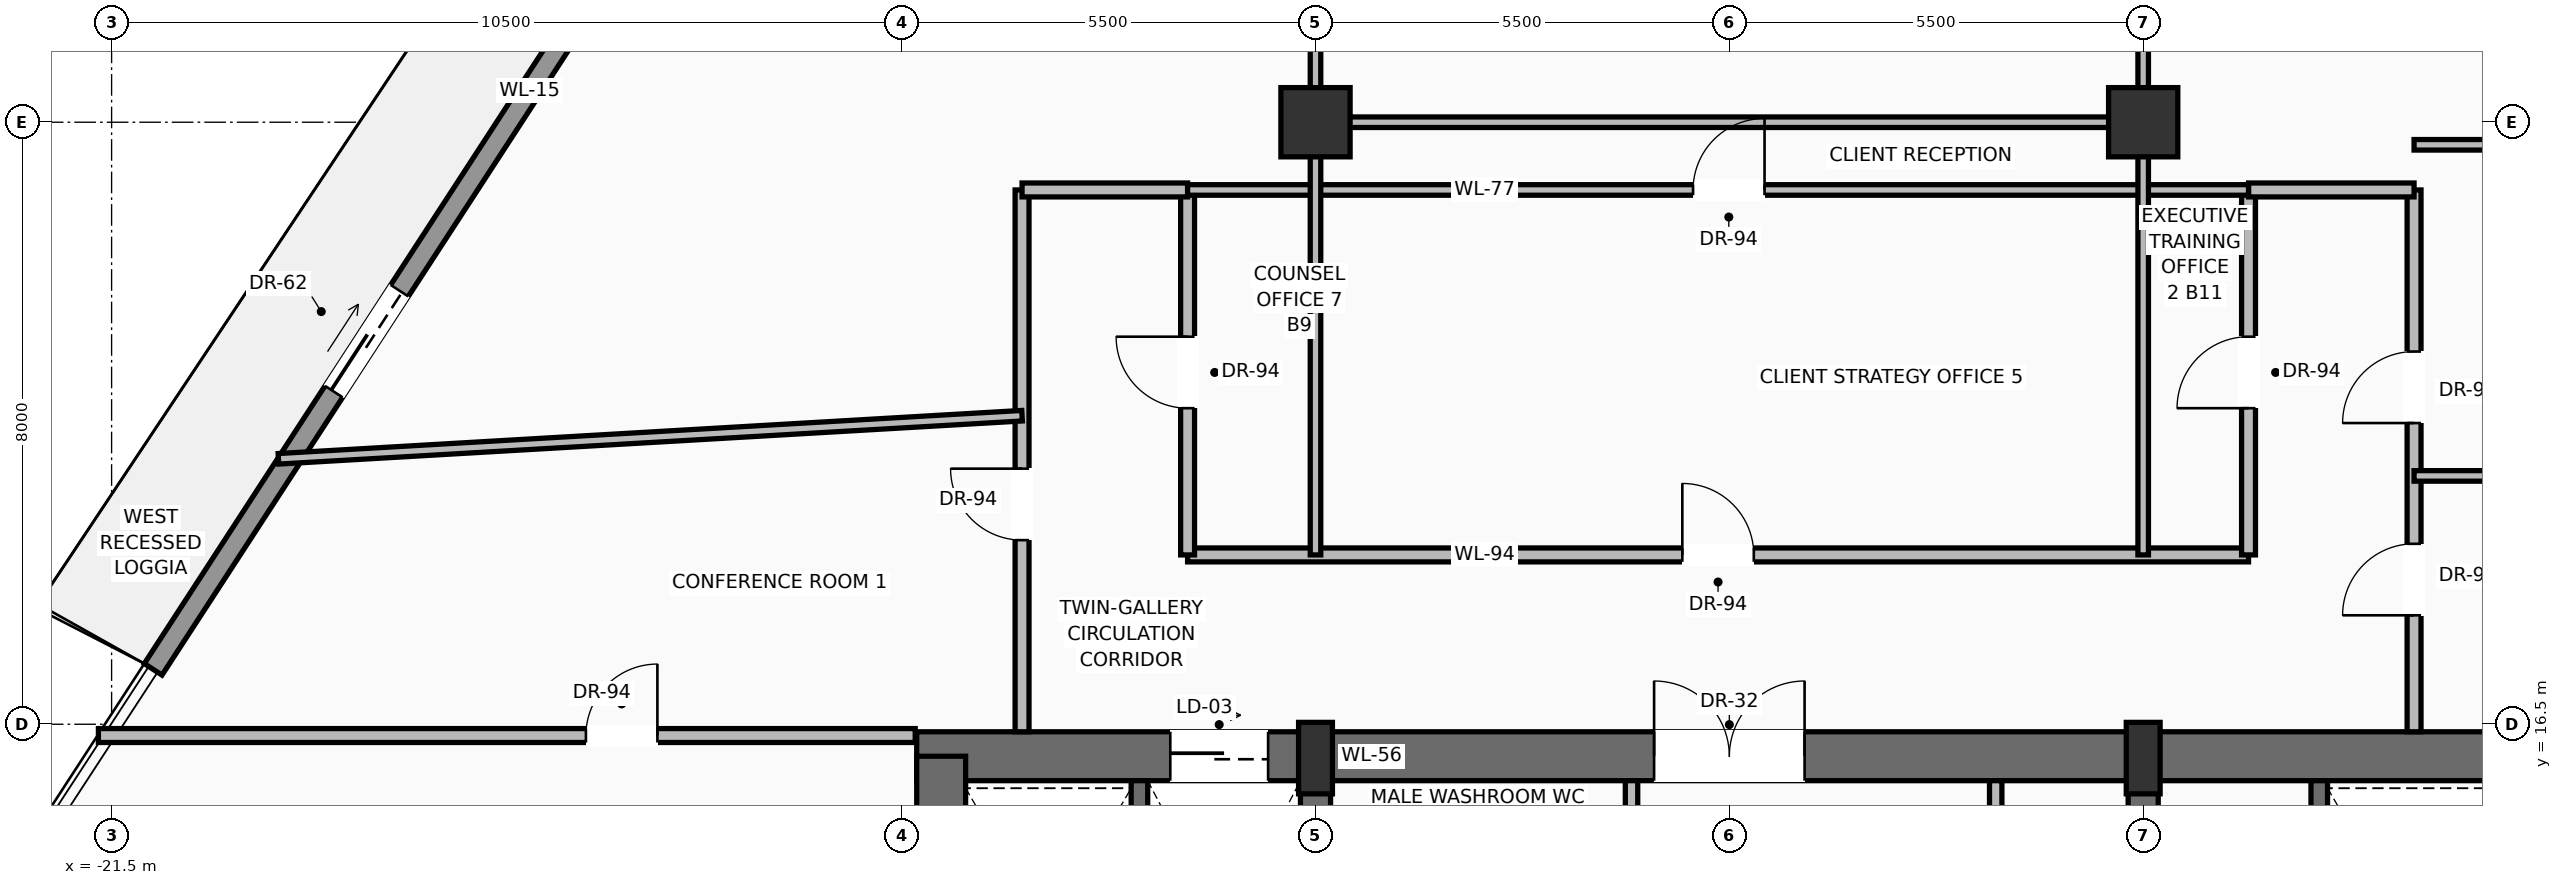
"""IFC4 building model, lengths in metres.
Left out: names, types, materials, properties, quantities, classifications, styles, units other than length and angle.
Written with IfcOpenShell. Run it as: python <this file> out.ifc"""

import sys

from ifc_helpers import new_model, si_unit, direction, frame, frame_2d, origin, origin_2d, place, context, subcontext, project, spatial, rectangle, extrude, source, transform, mapped, element, fill, save


model = new_model("IFC4")
c1 = context("Model", 3, precision=1e-05, world=origin(), true_north=direction((0.0, 1.0)))
c2 = subcontext(c1, "Body", "Model", "MODEL_VIEW")
j1 = project(units=[si_unit("LENGTHUNIT", "METRE"), si_unit("PLANEANGLEUNIT", "RADIAN")], contexts=[c1])
p1 = place(None, origin())
s1 = spatial("IfcSite", under=j1, at=p1, CompositionType="ELEMENT")
p2 = place(p1, origin())
s2 = spatial("IfcBuilding", under=s1, at=p2, CompositionType="ELEMENT")
p3 = place(p2, frame((0.0, 0.0, 140.4)))
s3 = spatial("IfcBuildingStorey", under=s2, at=p3, CompositionType="ELEMENT", Elevation=140.4)
p4 = place(p3, frame((-10.8, 16.075, 0.0), z_axis=(0.0, 0.0, 1.0), x_axis=(1.0, 0.0, 0.0)))
e1 = element("IfcWall", 1, at=p4, inside=s3, PredefinedType="SHEAR", context=c2, shape_type="SweptSolid", body=[
    extrude(rectangle(XDim=21.6, YDim=0.65, at=frame_2d((10.8, 0.0))), origin(), (0.0, 0.0, 1.0), 3.47),
])
p5 = place(p4, frame((3.37, 0.0, 0.0)))
e2 = element("IfcOpeningElement", 2, at=p5, cuts=e1, PredefinedType="OPENING", context=c2, shape_type="SweptSolid", body=[
    extrude(rectangle(XDim=1.3, YDim=2.3, at=frame_2d((0.65, 1.15))), frame((0.0, 0.335, 0.0), z_axis=(0.0, -1.0, 0.0), x_axis=(1.0, 0.0, 0.0)), (0.0, 0.0, 1.0), 0.67),
])
p6 = place(p4, frame((9.8, 0.0, 0.0)))
e3 = element("IfcOpeningElement", 3, at=p6, cuts=e1, PredefinedType="OPENING", context=c2, shape_type="SweptSolid", body=[
    extrude(rectangle(XDim=2.0, YDim=2.4, at=frame_2d((1.0, 1.2))), frame((0.0, 0.335, 0.0), z_axis=(0.0, -1.0, 0.0), x_axis=(1.0, 0.0, 0.0)), (0.0, 0.0, 1.0), 0.67),
])
p7 = place(p3, frame((-10.475, 0.525, 0.0), z_axis=(0.0, 0.0, 1.0), x_axis=(0.0, 1.0, 0.0)))
e4 = element("IfcWall", 4, at=p7, inside=s3, PredefinedType="SHEAR", context=c2, shape_type="SweptSolid", body=[
    extrude(rectangle(XDim=15.55, YDim=0.65, at=frame_2d((7.775, 0.0))), origin(), (0.0, 0.0, 1.0), 3.47),
])
p8 = place(p3, frame((-5.5, 0.525, 0.0), z_axis=(0.0, 0.0, 1.0), x_axis=(0.0, 1.0, 0.0)))
e5 = element("IfcWall", 5, at=p8, inside=s3, PredefinedType="SHEAR", context=c2, shape_type="SweptSolid", body=[
    extrude(rectangle(XDim=15.55, YDim=0.4, at=frame_2d((7.775, 0.0))), origin(), (0.0, 0.0, 1.0), 3.47),
])
p9 = place(p8, frame((8.975, 0.0, 0.0)))
e6 = element("IfcOpeningElement", 6, at=p9, cuts=e5, PredefinedType="OPENING", context=c2, shape_type="SweptSolid", body=[
    extrude(rectangle(XDim=1.1, YDim=2.2, at=frame_2d((0.55, 1.1))), frame((0.0, 0.21, 0.0), z_axis=(0.0, -1.0, 0.0), x_axis=(1.0, 0.0, 0.0)), (0.0, 0.0, 1.0), 0.42),
])
p10 = place(p3, frame((5.5, 0.525, 0.0), z_axis=(0.0, 0.0, 1.0), x_axis=(0.0, 1.0, 0.0)))
e7 = element("IfcWall", 7, at=p10, inside=s3, PredefinedType="SHEAR", context=c2, shape_type="SweptSolid", body=[
    extrude(rectangle(XDim=15.55, YDim=0.4, at=frame_2d((7.775, 0.0))), origin(), (0.0, 0.0, 1.0), 3.47),
])
p11 = place(p10, frame((8.975, 0.0, 0.0)))
e8 = element("IfcOpeningElement", 8, at=p11, cuts=e7, PredefinedType="OPENING", context=c2, shape_type="SweptSolid", body=[
    extrude(rectangle(XDim=1.1, YDim=2.2, at=frame_2d((0.55, 1.1))), frame((0.0, 0.21, 0.0), z_axis=(0.0, -1.0, 0.0), x_axis=(1.0, 0.0, 0.0)), (0.0, 0.0, 1.0), 0.42),
])
m1 = source(origin(), c2, "Body", "SweptSolid", [
    extrude(rectangle(XDim=0.45, YDim=0.95, at=origin_2d()), origin(), (0.0, 0.0, 1.0), 3.7),
])
for number, where, z_axis, x_axis in (
    (9, (-5.5, 16.05, 0.0), (0.0, 0.0, 1.0), (1.0, 0.0, 0.0)),
    (10, (5.5, 16.05, 0.0), (0.0, 0.0, 1.0), (1.0, 0.0, 0.0)),
):
    element("IfcColumn", number, at=place(p3, frame(where, z_axis=z_axis, x_axis=x_axis)), inside=s3, PredefinedType="PILASTER", context=c2, shape_type="MappedRepresentation", body=[
        mapped(m1, transform((0.0, 0.0, 0.0), scale=1.0)),
    ])
m2 = source(origin(), c2, "Body", "SweptSolid", [
    extrude(rectangle(XDim=0.92, YDim=0.92, at=origin_2d()), origin(), (0.0, 0.0, 1.0), 3.7),
])
for number, where, z_axis, x_axis in (
    (11, (-5.5, 24.5, 0.0), (0.0, 0.0, 1.0), (1.0, 0.0, 0.0)),
    (12, (5.5, 24.5, 0.0), (0.0, 0.0, 1.0), (1.0, 0.0, 0.0)),
):
    element("IfcColumn", number, at=place(p3, frame(where, z_axis=z_axis, x_axis=x_axis)), inside=s3, PredefinedType="COLUMN", context=c2, shape_type="MappedRepresentation", body=[
        mapped(m2, transform((0.0, 0.0, 0.0), scale=1.0)),
    ])
p12 = place(p3, frame((-20.948, 17.229, 0.0), z_axis=(0.0, 0.0, 1.0), x_axis=(0.545376053717, 0.838191481723, 0.0)))
e13 = element("IfcWall", 13, at=p12, inside=s3, PredefinedType="SOLIDWALL", context=c2, shape_type="SweptSolid", body=[
    extrude(rectangle(XDim=18.346, YDim=0.28, at=frame_2d((9.173, 0.0))), origin(), (0.0, 0.0, 1.0), 3.05),
])
p13 = place(p12, frame((4.403, 0.0, 0.0)))
e14 = element("IfcOpeningElement", 14, at=p13, cuts=e13, PredefinedType="OPENING", context=c2, shape_type="SweptSolid", body=[
    extrude(rectangle(XDim=1.6, YDim=2.35, at=frame_2d((0.8, 1.175))), frame((0.0, 0.15, 0.0), z_axis=(0.0, -1.0, 0.0), x_axis=(1.0, 0.0, 0.0)), (0.0, 0.0, 1.0), 0.3),
])
p14 = place(p12, frame((12.475, 0.0, 0.9)))
e15 = element("IfcOpeningElement", 15, at=p14, cuts=e13, PredefinedType="OPENING", context=c2, shape_type="SweptSolid", body=[
    extrude(rectangle(XDim=1.55, YDim=1.85, at=frame_2d((0.775, 0.925))), frame((0.0, 0.15, 0.0), z_axis=(0.0, -1.0, 0.0), x_axis=(1.0, 0.0, 0.0)), (0.0, 0.0, 1.0), 0.3),
])
for number, where, z_axis, x_axis in (
    (16, (-7.84, 11.87, 0.0), (0.0, 0.0, 1.0), (0.0, 1.0, 0.0)),
    (17, (7.84, 11.87, 0.0), (0.0, 0.0, 1.0), (0.0, 1.0, 0.0)),
):
    element("IfcWall", number, at=place(p3, frame(where, z_axis=z_axis, x_axis=x_axis)), inside=s3, PredefinedType="SOLIDWALL", context=c2, shape_type="SweptSolid", body=[
        extrude(rectangle(XDim=3.88, YDim=0.22, at=frame_2d((1.94, 0.0))), origin(), (0.0, 0.0, 1.0), 3.47),
    ])
p15 = place(p3, frame((-1.3, 13.6, 0.0), z_axis=(0.0, 0.0, 1.0), x_axis=(0.0, 1.0, 0.0)))
e18 = element("IfcWall", 18, at=p15, inside=s3, PredefinedType="PARTITIONING", context=c2, shape_type="SweptSolid", body=[
    extrude(rectangle(XDim=2.15, YDim=0.165, at=frame_2d((1.075, 0.0))), origin(), (0.0, 0.0, 1.0), 3.462),
])
p16 = place(p15, frame((0.55, 0.0, 0.0)))
e19 = element("IfcOpeningElement", 19, at=p16, cuts=e18, PredefinedType="OPENING", context=c2, shape_type="SweptSolid", body=[
    extrude(rectangle(XDim=0.9, YDim=2.1, at=frame_2d((0.45, 1.05))), frame((0.0, 0.093, 0.0), z_axis=(0.0, -1.0, 0.0), x_axis=(1.0, 0.0, 0.0)), (0.0, 0.0, 1.0), 0.185),
])
p17 = place(p3, frame((3.54, 11.22, 0.0), z_axis=(0.0, 0.0, 1.0), x_axis=(0.0, 1.0, 0.0)))
e20 = element("IfcWall", 20, at=p17, inside=s3, PredefinedType="PARTITIONING", context=c2, shape_type="SweptSolid", body=[
    extrude(rectangle(XDim=4.53, YDim=0.165, at=frame_2d((2.265, 0.0))), origin(), (0.0, 0.0, 1.0), 3.462),
])
p18 = place(p17, frame((1.25, 0.0, 0.0)))
e21 = element("IfcOpeningElement", 21, at=p18, cuts=e20, PredefinedType="OPENING", context=c2, shape_type="SweptSolid", body=[
    extrude(rectangle(XDim=0.9, YDim=2.1, at=frame_2d((0.45, 1.05))), frame((0.0, 0.093, 0.0), z_axis=(0.0, -1.0, 0.0), x_axis=(1.0, 0.0, 0.0)), (0.0, 0.0, 1.0), 0.185),
])
p19 = place(p3, frame((-7.2, 18.75, 0.0), z_axis=(0.0, 0.0, 1.0), x_axis=(1.0, 0.0, 0.0)))
e22 = element("IfcWall", 22, at=p19, inside=s3, PredefinedType="PARTITIONING", context=c2, shape_type="SweptSolid", body=[
    extrude(rectangle(XDim=14.1, YDim=0.185, at=frame_2d((7.05, 0.0))), origin(), (0.0, 0.0, 1.0), 2.846),
])
p20 = place(p19, frame((6.575, 0.0, 0.0)))
e23 = element("IfcOpeningElement", 23, at=p20, cuts=e22, PredefinedType="OPENING", context=c2, shape_type="SweptSolid", body=[
    extrude(rectangle(XDim=0.95, YDim=2.2, at=frame_2d((0.475, 1.1))), frame((0.0, 0.103, 0.0), z_axis=(0.0, -1.0, 0.0), x_axis=(1.0, 0.0, 0.0)), (0.0, 0.0, 1.0), 0.205),
])
p21 = place(p3, frame((-7.2, 18.75, 0.0), z_axis=(0.0, 0.0, 1.0), x_axis=(0.0, 1.0, 0.0)))
e24 = element("IfcWall", 24, at=p21, inside=s3, PredefinedType="PARTITIONING", context=c2, shape_type="SweptSolid", body=[
    extrude(rectangle(XDim=4.85, YDim=0.185, at=frame_2d((2.425, 0.0))), origin(), (0.0, 0.0, 1.0), 3.462),
])
p22 = place(p21, frame((1.95, 0.0, 0.0)))
e25 = element("IfcOpeningElement", 25, at=p22, cuts=e24, PredefinedType="OPENING", context=c2, shape_type="SweptSolid", body=[
    extrude(rectangle(XDim=0.95, YDim=2.2, at=frame_2d((0.475, 1.1))), frame((0.0, 0.103, 0.0), z_axis=(0.0, -1.0, 0.0), x_axis=(1.0, 0.0, 0.0)), (0.0, 0.0, 1.0), 0.205),
])
p23 = place(p3, frame((6.9, 18.75, 0.0), z_axis=(0.0, 0.0, 1.0), x_axis=(0.0, 1.0, 0.0)))
e26 = element("IfcWall", 26, at=p23, inside=s3, PredefinedType="PARTITIONING", context=c2, shape_type="SweptSolid", body=[
    extrude(rectangle(XDim=4.85, YDim=0.185, at=frame_2d((2.425, 0.0))), origin(), (0.0, 0.0, 1.0), 3.462),
])
p24 = place(p23, frame((1.95, 0.0, 0.0)))
e27 = element("IfcOpeningElement", 27, at=p24, cuts=e26, PredefinedType="OPENING", context=c2, shape_type="SweptSolid", body=[
    extrude(rectangle(XDim=0.95, YDim=2.2, at=frame_2d((0.475, 1.1))), frame((0.0, 0.103, 0.0), z_axis=(0.0, -1.0, 0.0), x_axis=(1.0, 0.0, 0.0)), (0.0, 0.0, 1.0), 0.205),
])
p25 = place(p3, frame((-9.4, 16.4, 0.0), z_axis=(0.0, 0.0, 1.0), x_axis=(0.0, 1.0, 0.0)))
e28 = element("IfcWall", 28, at=p25, inside=s3, PredefinedType="PARTITIONING", context=c2, shape_type="SweptSolid", body=[
    extrude(rectangle(XDim=7.2, YDim=0.185, at=frame_2d((3.6, 0.0))), origin(), (0.0, 0.0, 1.0), 3.462),
])
p26 = place(p25, frame((2.546, 0.0, 0.0)))
e29 = element("IfcOpeningElement", 29, at=p26, cuts=e28, PredefinedType="OPENING", context=c2, shape_type="SweptSolid", body=[
    extrude(rectangle(XDim=0.95, YDim=2.2, at=frame_2d((0.475, 1.1))), frame((0.0, 0.103, 0.0), z_axis=(0.0, -1.0, 0.0), x_axis=(1.0, 0.0, 0.0)), (0.0, 0.0, 1.0), 0.205),
])
p27 = place(p3, frame((9.1, 16.4, 0.0), z_axis=(0.0, 0.0, 1.0), x_axis=(0.0, 1.0, 0.0)))
e30 = element("IfcWall", 30, at=p27, inside=s3, PredefinedType="PARTITIONING", context=c2, shape_type="SweptSolid", body=[
    extrude(rectangle(XDim=7.2, YDim=0.185, at=frame_2d((3.6, 0.0))), origin(), (0.0, 0.0, 1.0), 3.462),
])
p28 = place(p27, frame((4.103, 0.0, 0.0)))
e31 = element("IfcOpeningElement", 31, at=p28, cuts=e30, PredefinedType="OPENING", context=c2, shape_type="SweptSolid", body=[
    extrude(rectangle(XDim=0.95, YDim=2.2, at=frame_2d((0.475, 1.1))), frame((0.0, 0.103, 0.0), z_axis=(0.0, -1.0, 0.0), x_axis=(1.0, 0.0, 0.0)), (0.0, 0.0, 1.0), 0.205),
])
p29 = place(p27, frame((1.548, 0.0, 0.0)))
e32 = element("IfcOpeningElement", 32, at=p29, cuts=e30, PredefinedType="OPENING", context=c2, shape_type="SweptSolid", body=[
    extrude(rectangle(XDim=0.95, YDim=2.2, at=frame_2d((0.475, 1.1))), frame((0.0, 0.103, 0.0), z_axis=(0.0, -1.0, 0.0), x_axis=(1.0, 0.0, 0.0)), (0.0, 0.0, 1.0), 0.205),
])
p30 = place(p3, frame((-9.4, 23.6, 0.0), z_axis=(0.0, 0.0, 1.0), x_axis=(1.0, 0.0, 0.0)))
e33 = element("IfcWall", 33, at=p30, inside=s3, PredefinedType="PARTITIONING", context=c2, shape_type="SweptSolid", body=[
    extrude(rectangle(XDim=2.2, YDim=0.185, at=frame_2d((1.1, 0.0))), origin(), (0.0, 0.0, 1.0), 3.462),
])
p31 = place(p3, frame((6.9, 23.6, 0.0), z_axis=(0.0, 0.0, 1.0), x_axis=(1.0, 0.0, 0.0)))
e34 = element("IfcWall", 34, at=p31, inside=s3, PredefinedType="PARTITIONING", context=c2, shape_type="SweptSolid", body=[
    extrude(rectangle(XDim=2.2, YDim=0.185, at=frame_2d((1.1, 0.0))), origin(), (0.0, 0.0, 1.0), 3.462),
])
p32 = place(p3, frame((-21.675, 16.35, 0.0), z_axis=(0.0, 0.0, 1.0), x_axis=(1.0, 0.0, 0.0)))
e35 = element("IfcWall", 35, at=p32, inside=s3, PredefinedType="PARTITIONING", context=c2, shape_type="SweptSolid", body=[
    extrude(rectangle(XDim=10.855, YDim=0.185, at=frame_2d((5.428, 0.0))), origin(), (0.0, 0.0, 1.0), 3.462),
])
p33 = place(p32, frame((6.479, 0.0, 0.0)))
e36 = element("IfcOpeningElement", 36, at=p33, cuts=e35, PredefinedType="OPENING", context=c2, shape_type="SweptSolid", body=[
    extrude(rectangle(XDim=0.95, YDim=2.2, at=frame_2d((0.475, 1.1))), frame((0.0, 0.103, 0.0), z_axis=(0.0, -1.0, 0.0), x_axis=(1.0, 0.0, 0.0)), (0.0, 0.0, 1.0), 0.205),
])
p34 = place(p3, frame((-7.2, 23.6, 0.0), z_axis=(0.0, 0.0, 1.0), x_axis=(1.0, 0.0, 0.0)))
e37 = element("IfcWall", 37, at=p34, inside=s3, PredefinedType="PARTITIONING", context=c2, shape_type="SweptSolid", body=[
    extrude(rectangle(XDim=14.1, YDim=0.14, at=frame_2d((7.05, 0.0))), origin(), (0.0, 0.0, 1.0), 3.462),
])
p35 = place(p34, frame((6.718, 0.0, 0.0)))
e38 = element("IfcOpeningElement", 38, at=p35, cuts=e37, PredefinedType="OPENING", context=c2, shape_type="SweptSolid", body=[
    extrude(rectangle(XDim=0.95, YDim=2.2, at=frame_2d((0.475, 1.1))), frame((0.0, 0.08, 0.0), z_axis=(0.0, -1.0, 0.0), x_axis=(1.0, 0.0, 0.0)), (0.0, 0.0, 1.0), 0.16),
])
for number, where, z_axis, x_axis in (
    (39, (-5.5, 18.75, 0.0), (0.0, 0.0, 1.0), (0.0, 1.0, 0.0)),
    (40, (5.5, 18.75, 0.0), (0.0, 0.0, 1.0), (0.0, 1.0, 0.0)),
):
    element("IfcWall", number, at=place(p3, frame(where, z_axis=z_axis, x_axis=x_axis)), inside=s3, PredefinedType="PARTITIONING", context=c2, shape_type="SweptSolid", body=[
        extrude(rectangle(XDim=13.75, YDim=0.14, at=frame_2d((6.875, 0.0))), origin(), (0.0, 0.0, 1.0), 2.846),
    ])
p36 = place(p3, frame((-5.5, 24.5, 0.0), z_axis=(0.0, 0.0, 1.0), x_axis=(1.0, 0.0, 0.0)))
e41 = element("IfcWall", 41, at=p36, inside=s3, PredefinedType="PARTITIONING", context=c2, shape_type="SweptSolid", body=[
    extrude(rectangle(XDim=11.0, YDim=0.14, at=frame_2d((5.5, 0.0))), origin(), (0.0, 0.0, 1.0), 2.846),
])
p37 = place(p3, frame((-19.283, 20.027, 0.0), z_axis=(0.0, 0.0, 1.0), x_axis=(0.998323429122, 0.057882042691, 0.0)))
e42 = element("IfcWall", 42, at=p37, inside=s3, PredefinedType="PARTITIONING", context=c2, shape_type="SweptSolid", body=[
    extrude(rectangle(XDim=9.899, YDim=0.14, at=frame_2d((4.95, 0.0))), origin(), (0.0, 0.0, 1.0), 3.462),
])
p38 = place(p3, frame((9.1, 19.8, 0.0), z_axis=(0.0, 0.0, 1.0), x_axis=(1.0, 0.0, 0.0)))
e43 = element("IfcWall", 43, at=p38, inside=s3, PredefinedType="PARTITIONING", context=c2, shape_type="SweptSolid", body=[
    extrude(rectangle(XDim=10.596, YDim=0.14, at=frame_2d((5.298, 0.0))), origin(), (0.0, 0.0, 1.0), 3.462),
])
p39 = place(p3, frame((9.1, 24.2, 0.0), z_axis=(0.0, 0.0, 1.0), x_axis=(1.0, 0.0, 0.0)))
e44 = element("IfcWall", 44, at=p39, inside=s3, PredefinedType="PARTITIONING", context=c2, shape_type="SweptSolid", body=[
    extrude(rectangle(XDim=7.792, YDim=0.14, at=frame_2d((3.896, 0.0))), origin(), (0.0, 0.0, 1.0), 3.462),
])
m3 = source(origin(), c2, "Body", "SweptSolid", [
    extrude(rectangle(XDim=1.6, YDim=2.35, at=frame_2d((0.8, 1.175))), frame((0.0, 0.025, 0.0), z_axis=(0.0, -1.0, 0.0), x_axis=(1.0, 0.0, 0.0)), (0.0, 0.0, 1.0), 0.05),
])
p40 = place(p13, origin())
e45 = element("IfcDoor", 45, at=p40, inside=s3, OperationType="SLIDING_TO_LEFT", PredefinedType="DOOR", context=c2, shape_type="MappedRepresentation", body=[
    mapped(m3, transform((0.0, 0.0, 0.0), scale=1.0)),
])
fill(e14, e45)
m4 = source(origin(), c2, "Body", "SweptSolid", [
    extrude(rectangle(XDim=1.3, YDim=2.3, at=frame_2d((0.65, 1.15))), frame((0.0, 0.025, 0.0), z_axis=(0.0, -1.0, 0.0), x_axis=(1.0, 0.0, 0.0)), (0.0, 0.0, 1.0), 0.05),
])
p41 = place(p5, origin())
e46 = element("IfcDoor", 46, at=p41, inside=s3, OperationType="SLIDING_TO_RIGHT", PredefinedType="DOOR", context=c2, shape_type="MappedRepresentation", body=[
    mapped(m4, transform((0.0, 0.0, 0.0), scale=1.0)),
])
fill(e2, e46)
m5 = source(origin(), c2, "Body", "SweptSolid", [
    extrude(rectangle(XDim=2.0, YDim=2.4, at=frame_2d((1.0, 1.2))), frame((0.0, 0.025, 0.0), z_axis=(0.0, -1.0, 0.0), x_axis=(1.0, 0.0, 0.0)), (0.0, 0.0, 1.0), 0.05),
])
p42 = place(p6, origin())
e47 = element("IfcDoor", 47, at=p42, inside=s3, OperationType="DOUBLE_DOOR_SINGLE_SWING", PredefinedType="DOOR", context=c2, shape_type="MappedRepresentation", body=[
    mapped(m5, transform((0.0, 0.0, 0.0), scale=1.0)),
])
fill(e3, e47)
m6 = source(origin(), c2, "Body", "SweptSolid", [
    extrude(rectangle(XDim=0.95, YDim=2.2, at=frame_2d((0.475, 1.1))), frame((0.0, 0.025, 0.0), z_axis=(0.0, -1.0, 0.0), x_axis=(1.0, 0.0, 0.0)), (0.0, 0.0, 1.0), 0.05),
])
p43 = place(p20, origin())
e48 = element("IfcDoor", 48, at=p43, inside=s3, OperationType="SINGLE_SWING_LEFT", PredefinedType="DOOR", context=c2, shape_type="MappedRepresentation", body=[
    mapped(m6, transform((0.0, 0.0, 0.0), scale=1.0)),
])
fill(e23, e48)
p44 = place(p26, origin())
e49 = element("IfcDoor", 49, at=p44, inside=s3, OperationType="SINGLE_SWING_RIGHT", PredefinedType="DOOR", context=c2, shape_type="MappedRepresentation", body=[
    mapped(m6, transform((0.0, 0.0, 0.0), scale=1.0)),
])
fill(e29, e49)
p45 = place(p28, origin())
e50 = element("IfcDoor", 50, at=p45, inside=s3, OperationType="SINGLE_SWING_LEFT", PredefinedType="DOOR", context=c2, shape_type="MappedRepresentation", body=[
    mapped(m6, transform((0.0, 0.0, 0.0), scale=1.0)),
])
fill(e31, e50)
p46 = place(p33, origin())
e51 = element("IfcDoor", 51, at=p46, inside=s3, OperationType="SINGLE_SWING_RIGHT", PredefinedType="DOOR", context=c2, shape_type="MappedRepresentation", body=[
    mapped(m6, transform((0.0, 0.0, 0.0), scale=1.0)),
])
fill(e36, e51)
p47 = place(p29, origin())
e52 = element("IfcDoor", 52, at=p47, inside=s3, OperationType="SINGLE_SWING_LEFT", PredefinedType="DOOR", context=c2, shape_type="MappedRepresentation", body=[
    mapped(m6, transform((0.0, 0.0, 0.0), scale=1.0)),
])
fill(e32, e52)
p48 = place(p22, origin())
e53 = element("IfcDoor", 53, at=p48, inside=s3, OperationType="SINGLE_SWING_RIGHT", PredefinedType="DOOR", context=c2, shape_type="MappedRepresentation", body=[
    mapped(m6, transform((0.0, 0.0, 0.0), scale=1.0)),
])
fill(e25, e53)
p49 = place(p24, origin())
e54 = element("IfcDoor", 54, at=p49, inside=s3, OperationType="SINGLE_SWING_LEFT", PredefinedType="DOOR", context=c2, shape_type="MappedRepresentation", body=[
    mapped(m6, transform((0.0, 0.0, 0.0), scale=1.0)),
])
fill(e27, e54)
p50 = place(p35, origin())
e55 = element("IfcDoor", 55, at=p50, inside=s3, OperationType="SINGLE_SWING_RIGHT", PredefinedType="DOOR", context=c2, shape_type="MappedRepresentation", body=[
    mapped(m6, transform((0.0, 0.0, 0.0), scale=1.0)),
])
fill(e38, e55)
save(model, sys.argv[1])
